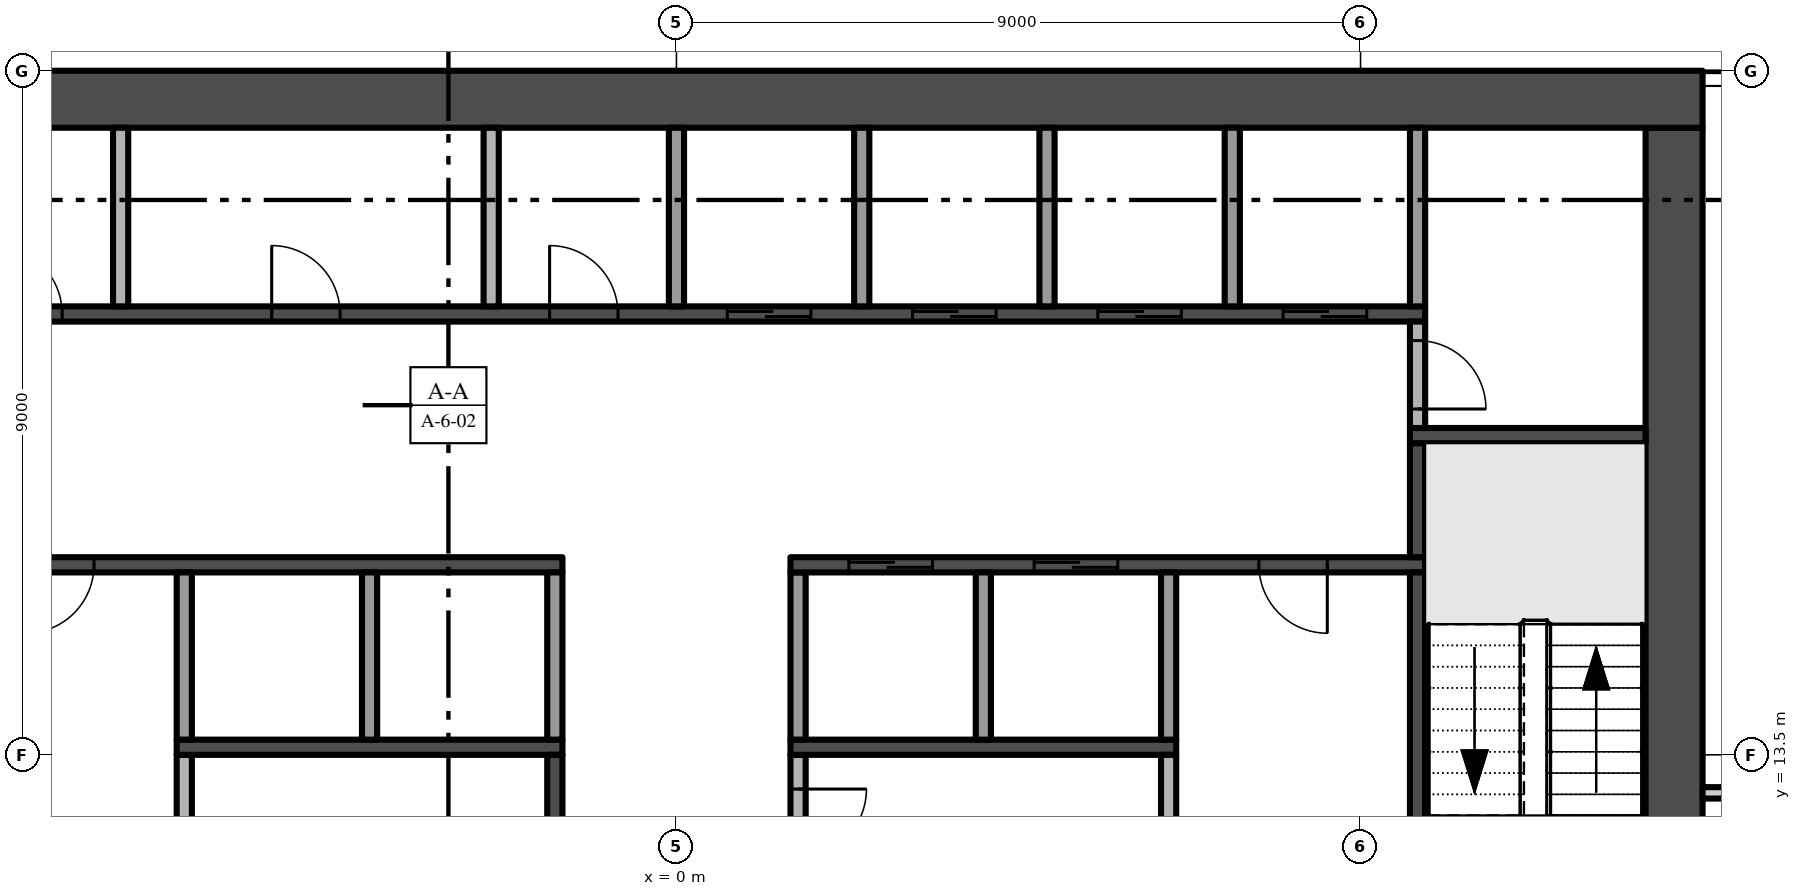
"""IFC4 building model, lengths in metres.
Left out: names, types, materials, properties, quantities, classifications, styles, units other than length and angle.
Written with IfcOpenShell. Run it as: python <this file> out.ifc"""

import sys

from ifc_helpers import new_model, si_unit, direction, frame, frame_2d, origin, place, context, subcontext, project, spatial, rectangle, extrude, element, fill, save


model = new_model("IFC4")
c1 = context("Model", 3, precision=1e-05, world=origin(), true_north=direction((0.0, 1.0)))
c2 = subcontext(c1, "Body", "Model", "MODEL_VIEW")
j1 = project(units=[si_unit("LENGTHUNIT", "METRE"), si_unit("PLANEANGLEUNIT", "RADIAN")], contexts=[c1])
p1 = place(None, origin())
s1 = spatial("IfcSite", under=j1, at=p1, CompositionType="ELEMENT")
p2 = place(p1, origin())
s2 = spatial("IfcBuilding", under=s1, at=p2, CompositionType="ELEMENT")
p3 = place(p2, frame((0.0, 0.0, 179.4)))
s3 = spatial("IfcBuildingStorey", under=s2, at=p3, CompositionType="ELEMENT", Elevation=179.4)
p4 = place(p3, frame((13.125, 5.25, -0.3), z_axis=(0.0, 0.0, 1.0), x_axis=(0.0, 1.0, 0.0)))
e1 = element("IfcWall", 1, at=p4, inside=s3, PredefinedType="SHEAR", context=c2, shape_type="SweptSolid", body=[
    extrude(rectangle(XDim=16.5, YDim=0.75, at=frame_2d((8.25, 0.0))), origin(), (0.0, 0.0, 1.0), 5.0),
])
p5 = place(p4, frame((6.15, 0.0, 0.3)))
e2 = element("IfcOpeningElement", 2, at=p5, cuts=e1, PredefinedType="OPENING", context=c2, shape_type="SweptSolid", body=[
    extrude(rectangle(XDim=1.2, YDim=2.2, at=frame_2d((0.6, 1.1))), frame((0.0, 0.385, 0.0), z_axis=(0.0, -1.0, 0.0), x_axis=(1.0, 0.0, 0.0)), (0.0, 0.0, 1.0), 0.77),
])
p6 = place(p3, frame((13.5, 22.125, -0.3), z_axis=(0.0, 0.0, 1.0), x_axis=(-1.0, 0.0, 0.0)))
e3 = element("IfcWall", 3, at=p6, inside=s3, PredefinedType="SHEAR", context=c2, shape_type="SweptSolid", body=[
    extrude(rectangle(XDim=27.0, YDim=0.75, at=frame_2d((13.5, 0.0))), origin(), (0.0, 0.0, 1.0), 5.0),
])
p7 = place(p3, frame((-1.5, 16.0, 0.0), z_axis=(0.0, 0.0, 1.0), x_axis=(-1.0, 0.0, 0.0)))
e4 = element("IfcWall", 4, at=p7, inside=s3, PredefinedType="SHEAR", context=c2, shape_type="SweptSolid", body=[
    extrude(rectangle(XDim=8.35, YDim=0.2, at=frame_2d((4.175, 0.0))), origin(), (0.0, 0.0, 1.0), 4.7),
])
p8 = place(p7, frame((6.162, 0.0, 0.0)))
e5 = element("IfcOpeningElement", 5, at=p8, cuts=e4, PredefinedType="OPENING", context=c2, shape_type="SweptSolid", body=[
    extrude(rectangle(XDim=0.9, YDim=2.1, at=frame_2d((0.45, 1.05))), frame((0.0, 0.11, 0.0), z_axis=(0.0, -1.0, 0.0), x_axis=(1.0, 0.0, 0.0)), (0.0, 0.0, 1.0), 0.22),
])
p9 = place(p3, frame((-9.85, 19.3, 0.0), z_axis=(0.0, 0.0, 1.0), x_axis=(1.0, 0.0, 0.0)))
e6 = element("IfcWall", 6, at=p9, inside=s3, PredefinedType="SHEAR", context=c2, shape_type="SweptSolid", body=[
    extrude(rectangle(XDim=19.7, YDim=0.2, at=frame_2d((9.85, 0.0))), origin(), (0.0, 0.0, 1.0), 4.7),
])
p10 = place(p9, frame((10.519, 0.0, 0.0)))
e7 = element("IfcOpeningElement", 7, at=p10, cuts=e6, PredefinedType="OPENING", context=c2, shape_type="SweptSolid", body=[
    extrude(rectangle(XDim=1.1, YDim=2.1, at=frame_2d((0.55, 1.05))), frame((0.0, 0.11, 0.0), z_axis=(0.0, -1.0, 0.0), x_axis=(1.0, 0.0, 0.0)), (0.0, 0.0, 1.0), 0.22),
])
p11 = place(p9, frame((12.956, 0.0, 0.0)))
e8 = element("IfcOpeningElement", 8, at=p11, cuts=e6, PredefinedType="OPENING", context=c2, shape_type="SweptSolid", body=[
    extrude(rectangle(XDim=1.1, YDim=2.1, at=frame_2d((0.55, 1.05))), frame((0.0, 0.11, 0.0), z_axis=(0.0, -1.0, 0.0), x_axis=(1.0, 0.0, 0.0)), (0.0, 0.0, 1.0), 0.22),
])
p12 = place(p9, frame((15.394, 0.0, 0.0)))
e9 = element("IfcOpeningElement", 9, at=p12, cuts=e6, PredefinedType="OPENING", context=c2, shape_type="SweptSolid", body=[
    extrude(rectangle(XDim=1.1, YDim=2.1, at=frame_2d((0.55, 1.05))), frame((0.0, 0.11, 0.0), z_axis=(0.0, -1.0, 0.0), x_axis=(1.0, 0.0, 0.0)), (0.0, 0.0, 1.0), 0.22),
])
p13 = place(p9, frame((17.831, 0.0, 0.0)))
e10 = element("IfcOpeningElement", 10, at=p13, cuts=e6, PredefinedType="OPENING", context=c2, shape_type="SweptSolid", body=[
    extrude(rectangle(XDim=1.1, YDim=2.1, at=frame_2d((0.55, 1.05))), frame((0.0, 0.11, 0.0), z_axis=(0.0, -1.0, 0.0), x_axis=(1.0, 0.0, 0.0)), (0.0, 0.0, 1.0), 0.22),
])
p14 = place(p9, frame((0.869, 0.0, 0.0)))
e11 = element("IfcOpeningElement", 11, at=p14, cuts=e6, PredefinedType="OPENING", context=c2, shape_type="SweptSolid", body=[
    extrude(rectangle(XDim=0.9, YDim=2.1, at=frame_2d((0.45, 1.05))), frame((0.0, 0.11, 0.0), z_axis=(0.0, -1.0, 0.0), x_axis=(1.0, 0.0, 0.0)), (0.0, 0.0, 1.0), 0.22),
])
p15 = place(p9, frame((4.525, 0.0, 0.0)))
e12 = element("IfcOpeningElement", 12, at=p15, cuts=e6, PredefinedType="OPENING", context=c2, shape_type="SweptSolid", body=[
    extrude(rectangle(XDim=0.9, YDim=2.1, at=frame_2d((0.45, 1.05))), frame((0.0, 0.11, 0.0), z_axis=(0.0, -1.0, 0.0), x_axis=(1.0, 0.0, 0.0)), (0.0, 0.0, 1.0), 0.22),
])
p16 = place(p9, frame((8.181, 0.0, 0.0)))
e13 = element("IfcOpeningElement", 13, at=p16, cuts=e6, PredefinedType="OPENING", context=c2, shape_type="SweptSolid", body=[
    extrude(rectangle(XDim=0.9, YDim=2.1, at=frame_2d((0.45, 1.05))), frame((0.0, 0.11, 0.0), z_axis=(0.0, -1.0, 0.0), x_axis=(1.0, 0.0, 0.0)), (0.0, 0.0, 1.0), 0.22),
])
p17 = place(p3, frame((-7.312, 19.4, 0.0), z_axis=(0.0, 0.0, 1.0), x_axis=(0.0, 1.0, 0.0)))
e14 = element("IfcWall", 14, at=p17, inside=s3, PredefinedType="PARTITIONING", context=c2, shape_type="SweptSolid", body=[
    extrude(rectangle(XDim=2.35, YDim=0.2, at=frame_2d((1.175, 0.0))), origin(), (0.0, 0.0, 1.0), 4.7),
])
p18 = place(p3, frame((-6.475, 8.15, 0.0), z_axis=(0.0, 0.0, 1.0), x_axis=(0.0, 1.0, 0.0)))
e15 = element("IfcWall", 15, at=p18, inside=s3, PredefinedType="PARTITIONING", context=c2, shape_type="SweptSolid", body=[
    extrude(rectangle(XDim=5.35, YDim=0.2, at=frame_2d((2.675, 0.0))), origin(), (0.0, 0.0, 1.0), 4.7),
])
p19 = place(p3, frame((-6.575, 13.6, 0.0), z_axis=(0.0, 0.0, 1.0), x_axis=(1.0, 0.0, 0.0)))
e16 = element("IfcWall", 16, at=p19, inside=s3, PredefinedType="SHEAR", context=c2, shape_type="SweptSolid", body=[
    extrude(rectangle(XDim=5.075, YDim=0.2, at=frame_2d((2.538, 0.0))), origin(), (0.0, 0.0, 1.0), 4.7),
])
for number, where, z_axis, x_axis in (
    (17, (-6.475, 13.7, 0.0), (0.0, 0.0, 1.0), (0.0, 1.0, 0.0)),
    (18, (-4.037, 13.7, 0.0), (0.0, 0.0, 1.0), (0.0, 1.0, 0.0)),
):
    element("IfcWall", number, at=place(p3, frame(where, z_axis=z_axis, x_axis=x_axis)), inside=s3, PredefinedType="PARTITIONING", context=c2, shape_type="SweptSolid", body=[
        extrude(rectangle(XDim=2.2, YDim=0.2, at=frame_2d((1.1, 0.0))), origin(), (0.0, 0.0, 1.0), 4.7),
    ])
p20 = place(p3, frame((-2.438, 19.4, 0.0), z_axis=(0.0, 0.0, 1.0), x_axis=(0.0, 1.0, 0.0)))
e19 = element("IfcWall", 19, at=p20, inside=s3, PredefinedType="PARTITIONING", context=c2, shape_type="SweptSolid", body=[
    extrude(rectangle(XDim=2.35, YDim=0.2, at=frame_2d((1.175, 0.0))), origin(), (0.0, 0.0, 1.0), 4.7),
])
p21 = place(p3, frame((-1.6, 8.15, 0.0), z_axis=(0.0, 0.0, 1.0), x_axis=(0.0, 1.0, 0.0)))
e20 = element("IfcWall", 20, at=p21, inside=s3, PredefinedType="SHEAR", context=c2, shape_type="SweptSolid", body=[
    extrude(rectangle(XDim=5.35, YDim=0.2, at=frame_2d((2.675, 0.0))), origin(), (0.0, 0.0, 1.0), 4.7),
])
p22 = place(p21, frame((2.225, 0.0, 0.0)))
e21 = element("IfcOpeningElement", 21, at=p22, cuts=e20, PredefinedType="OPENING", context=c2, shape_type="SweptSolid", body=[
    extrude(rectangle(XDim=0.9, YDim=2.1, at=frame_2d((0.45, 1.05))), frame((0.0, 0.11, 0.0), z_axis=(0.0, -1.0, 0.0), x_axis=(1.0, 0.0, 0.0)), (0.0, 0.0, 1.0), 0.22),
])
p23 = place(p3, frame((-1.6, 13.7, 0.0), z_axis=(0.0, 0.0, 1.0), x_axis=(0.0, 1.0, 0.0)))
e22 = element("IfcWall", 22, at=p23, inside=s3, PredefinedType="PARTITIONING", context=c2, shape_type="SweptSolid", body=[
    extrude(rectangle(XDim=2.2, YDim=0.2, at=frame_2d((1.1, 0.0))), origin(), (0.0, 0.0, 1.0), 4.7),
])
p24 = place(p3, frame((0.0, 19.4, 0.0), z_axis=(0.0, 0.0, 1.0), x_axis=(0.0, 1.0, 0.0)))
e23 = element("IfcWall", 23, at=p24, inside=s3, PredefinedType="PARTITIONING", context=c2, shape_type="SweptSolid", body=[
    extrude(rectangle(XDim=2.35, YDim=0.2, at=frame_2d((1.175, 0.0))), origin(), (0.0, 0.0, 1.0), 4.7),
])
p25 = place(p3, frame((1.6, 13.5, 0.0), z_axis=(0.0, 0.0, 1.0), x_axis=(0.0, -1.0, 0.0)))
e24 = element("IfcWall", 24, at=p25, inside=s3, PredefinedType="PARTITIONING", context=c2, shape_type="SweptSolid", body=[
    extrude(rectangle(XDim=1.8, YDim=0.2, at=frame_2d((0.9, 0.0))), origin(), (0.0, 0.0, 1.0), 4.7),
])
p26 = place(p25, frame((0.45, 0.0, 0.0)))
e25 = element("IfcOpeningElement", 25, at=p26, cuts=e24, PredefinedType="OPENING", context=c2, shape_type="SweptSolid", body=[
    extrude(rectangle(XDim=0.9, YDim=2.1, at=frame_2d((0.45, 1.05))), frame((0.0, 0.11, 0.0), z_axis=(0.0, -1.0, 0.0), x_axis=(1.0, 0.0, 0.0)), (0.0, 0.0, 1.0), 0.22),
])
p27 = place(p3, frame((1.5, 13.6, 0.0), z_axis=(0.0, 0.0, 1.0), x_axis=(1.0, 0.0, 0.0)))
e26 = element("IfcWall", 26, at=p27, inside=s3, PredefinedType="SHEAR", context=c2, shape_type="SweptSolid", body=[
    extrude(rectangle(XDim=5.075, YDim=0.2, at=frame_2d((2.538, 0.0))), origin(), (0.0, 0.0, 1.0), 4.7),
])
p28 = place(p3, frame((1.6, 13.7, 0.0), z_axis=(0.0, 0.0, 1.0), x_axis=(0.0, 1.0, 0.0)))
e27 = element("IfcWall", 27, at=p28, inside=s3, PredefinedType="PARTITIONING", context=c2, shape_type="SweptSolid", body=[
    extrude(rectangle(XDim=2.2, YDim=0.2, at=frame_2d((1.1, 0.0))), origin(), (0.0, 0.0, 1.0), 4.7),
])
p29 = place(p3, frame((9.85, 16.0, 0.0), z_axis=(0.0, 0.0, 1.0), x_axis=(-1.0, 0.0, 0.0)))
e28 = element("IfcWall", 28, at=p29, inside=s3, PredefinedType="SHEAR", context=c2, shape_type="SweptSolid", body=[
    extrude(rectangle(XDim=8.35, YDim=0.2, at=frame_2d((4.175, 0.0))), origin(), (0.0, 0.0, 1.0), 4.7),
])
p30 = place(p29, frame((6.481, 0.0, 0.0)))
e29 = element("IfcOpeningElement", 29, at=p30, cuts=e28, PredefinedType="OPENING", context=c2, shape_type="SweptSolid", body=[
    extrude(rectangle(XDim=1.1, YDim=2.1, at=frame_2d((0.55, 1.05))), frame((0.0, 0.11, 0.0), z_axis=(0.0, -1.0, 0.0), x_axis=(1.0, 0.0, 0.0)), (0.0, 0.0, 1.0), 0.22),
])
p31 = place(p29, frame((4.044, 0.0, 0.0)))
e30 = element("IfcOpeningElement", 30, at=p31, cuts=e28, PredefinedType="OPENING", context=c2, shape_type="SweptSolid", body=[
    extrude(rectangle(XDim=1.1, YDim=2.1, at=frame_2d((0.55, 1.05))), frame((0.0, 0.11, 0.0), z_axis=(0.0, -1.0, 0.0), x_axis=(1.0, 0.0, 0.0)), (0.0, 0.0, 1.0), 0.22),
])
p32 = place(p29, frame((1.288, 0.0, 0.0)))
e31 = element("IfcOpeningElement", 31, at=p32, cuts=e28, PredefinedType="OPENING", context=c2, shape_type="SweptSolid", body=[
    extrude(rectangle(XDim=0.9, YDim=2.1, at=frame_2d((0.45, 1.05))), frame((0.0, 0.11, 0.0), z_axis=(0.0, -1.0, 0.0), x_axis=(1.0, 0.0, 0.0)), (0.0, 0.0, 1.0), 0.22),
])
p33 = place(p3, frame((2.438, 19.4, 0.0), z_axis=(0.0, 0.0, 1.0), x_axis=(0.0, 1.0, 0.0)))
e32 = element("IfcWall", 32, at=p33, inside=s3, PredefinedType="PARTITIONING", context=c2, shape_type="SweptSolid", body=[
    extrude(rectangle(XDim=2.35, YDim=0.2, at=frame_2d((1.175, 0.0))), origin(), (0.0, 0.0, 1.0), 4.7),
])
p34 = place(p3, frame((4.037, 13.7, 0.0), z_axis=(0.0, 0.0, 1.0), x_axis=(0.0, 1.0, 0.0)))
e33 = element("IfcWall", 33, at=p34, inside=s3, PredefinedType="PARTITIONING", context=c2, shape_type="SweptSolid", body=[
    extrude(rectangle(XDim=2.2, YDim=0.2, at=frame_2d((1.1, 0.0))), origin(), (0.0, 0.0, 1.0), 4.7),
])
p35 = place(p3, frame((4.875, 19.4, 0.0), z_axis=(0.0, 0.0, 1.0), x_axis=(0.0, 1.0, 0.0)))
e34 = element("IfcWall", 34, at=p35, inside=s3, PredefinedType="PARTITIONING", context=c2, shape_type="SweptSolid", body=[
    extrude(rectangle(XDim=2.35, YDim=0.2, at=frame_2d((1.175, 0.0))), origin(), (0.0, 0.0, 1.0), 4.7),
])
p36 = place(p3, frame((6.475, 12.3, 0.0), z_axis=(0.0, 0.0, 1.0), x_axis=(0.0, 1.0, 0.0)))
e35 = element("IfcWall", 35, at=p36, inside=s3, PredefinedType="PARTITIONING", context=c2, shape_type="SweptSolid", body=[
    extrude(rectangle(XDim=1.2, YDim=0.2, at=frame_2d((0.6, 0.0))), origin(), (0.0, 0.0, 1.0), 4.7),
])
p37 = place(p3, frame((6.475, 13.7, 0.0), z_axis=(0.0, 0.0, 1.0), x_axis=(0.0, 1.0, 0.0)))
e36 = element("IfcWall", 36, at=p37, inside=s3, PredefinedType="PARTITIONING", context=c2, shape_type="SweptSolid", body=[
    extrude(rectangle(XDim=2.2, YDim=0.2, at=frame_2d((1.1, 0.0))), origin(), (0.0, 0.0, 1.0), 4.7),
])
p38 = place(p3, frame((7.312, 19.4, 0.0), z_axis=(0.0, 0.0, 1.0), x_axis=(0.0, 1.0, 0.0)))
e37 = element("IfcWall", 37, at=p38, inside=s3, PredefinedType="PARTITIONING", context=c2, shape_type="SweptSolid", body=[
    extrude(rectangle(XDim=2.35, YDim=0.2, at=frame_2d((1.175, 0.0))), origin(), (0.0, 0.0, 1.0), 4.7),
])
p39 = place(p3, frame((9.75, 12.3, 0.0), z_axis=(0.0, 0.0, 1.0), x_axis=(0.0, 1.0, 0.0)))
e38 = element("IfcWall", 38, at=p39, inside=s3, PredefinedType="SHEAR", context=c2, shape_type="SweptSolid", body=[
    extrude(rectangle(XDim=3.6, YDim=0.2, at=frame_2d((1.8, 0.0))), origin(), (0.0, 0.0, 1.0), 4.7),
])
p40 = place(p3, frame((9.75, 16.1, 0.0), z_axis=(0.0, 0.0, 1.0), x_axis=(0.0, 1.0, 0.0)))
e39 = element("IfcWall", 39, at=p40, inside=s3, PredefinedType="SHEAR", context=c2, shape_type="SweptSolid", body=[
    extrude(rectangle(XDim=1.5, YDim=0.2, at=frame_2d((0.75, 0.0))), origin(), (0.0, 0.0, 1.0), 4.7),
])
p41 = place(p3, frame((9.65, 17.7, 0.0), z_axis=(0.0, 0.0, 1.0), x_axis=(1.0, 0.0, 0.0)))
e40 = element("IfcWall", 40, at=p41, inside=s3, PredefinedType="SHEAR", context=c2, shape_type="SweptSolid", body=[
    extrude(rectangle(XDim=3.1, YDim=0.2, at=frame_2d((1.55, 0.0))), origin(), (0.0, 0.0, 1.0), 4.7),
])
p42 = place(p3, frame((9.75, 19.2, 0.0), z_axis=(0.0, 0.0, 1.0), x_axis=(0.0, -1.0, 0.0)))
e41 = element("IfcWall", 41, at=p42, inside=s3, PredefinedType="PARTITIONING", context=c2, shape_type="SweptSolid", body=[
    extrude(rectangle(XDim=1.4, YDim=0.2, at=frame_2d((0.7, 0.0))), origin(), (0.0, 0.0, 1.0), 4.7),
])
p43 = place(p42, frame((0.25, 0.0, 0.0)))
e42 = element("IfcOpeningElement", 42, at=p43, cuts=e41, PredefinedType="OPENING", context=c2, shape_type="SweptSolid", body=[
    extrude(rectangle(XDim=0.9, YDim=2.1, at=frame_2d((0.45, 1.05))), frame((0.0, 0.11, 0.0), z_axis=(0.0, -1.0, 0.0), x_axis=(1.0, 0.0, 0.0)), (0.0, 0.0, 1.0), 0.22),
])
p44 = place(p3, frame((9.75, 19.4, 0.0), z_axis=(0.0, 0.0, 1.0), x_axis=(0.0, 1.0, 0.0)))
e43 = element("IfcWall", 43, at=p44, inside=s3, PredefinedType="PARTITIONING", context=c2, shape_type="SweptSolid", body=[
    extrude(rectangle(XDim=2.35, YDim=0.2, at=frame_2d((1.175, 0.0))), origin(), (0.0, 0.0, 1.0), 4.7),
])
p45 = place(p3, frame((13.5, 13.0, 0.0), z_axis=(0.0, 0.0, 1.0), x_axis=(1.0, 0.0, 0.0)))
e44 = element("IfcWall", 44, at=p45, inside=s3, PredefinedType="PARTITIONING", context=c2, shape_type="SweptSolid", body=[
    extrude(rectangle(XDim=3.925, YDim=0.15, at=frame_2d((1.962, 0.0))), origin(), (0.0, 0.0, 1.0), 4.7),
])
p46 = place(p10, origin())
e45 = element("IfcDoor", 45, at=p46, inside=s3, OperationType="SLIDING_TO_RIGHT", PredefinedType="DOOR", context=c2, shape_type="SweptSolid", body=[
    extrude(rectangle(XDim=1.1, YDim=2.1, at=frame_2d((0.55, 1.05))), frame((0.0, 0.025, 0.0), z_axis=(0.0, -1.0, 0.0), x_axis=(1.0, 0.0, 0.0)), (0.0, 0.0, 1.0), 0.05),
])
fill(e7, e45)
p47 = place(p11, origin())
e46 = element("IfcDoor", 46, at=p47, inside=s3, OperationType="SLIDING_TO_RIGHT", PredefinedType="DOOR", context=c2, shape_type="SweptSolid", body=[
    extrude(rectangle(XDim=1.1, YDim=2.1, at=frame_2d((0.55, 1.05))), frame((0.0, 0.025, 0.0), z_axis=(0.0, -1.0, 0.0), x_axis=(1.0, 0.0, 0.0)), (0.0, 0.0, 1.0), 0.05),
])
fill(e8, e46)
p48 = place(p12, origin())
e47 = element("IfcDoor", 47, at=p48, inside=s3, OperationType="SLIDING_TO_RIGHT", PredefinedType="DOOR", context=c2, shape_type="SweptSolid", body=[
    extrude(rectangle(XDim=1.1, YDim=2.1, at=frame_2d((0.55, 1.05))), frame((0.0, 0.025, 0.0), z_axis=(0.0, -1.0, 0.0), x_axis=(1.0, 0.0, 0.0)), (0.0, 0.0, 1.0), 0.05),
])
fill(e9, e47)
p49 = place(p13, origin())
e48 = element("IfcDoor", 48, at=p49, inside=s3, OperationType="SLIDING_TO_RIGHT", PredefinedType="DOOR", context=c2, shape_type="SweptSolid", body=[
    extrude(rectangle(XDim=1.1, YDim=2.1, at=frame_2d((0.55, 1.05))), frame((0.0, 0.025, 0.0), z_axis=(0.0, -1.0, 0.0), x_axis=(1.0, 0.0, 0.0)), (0.0, 0.0, 1.0), 0.05),
])
fill(e10, e48)
p50 = place(p30, origin())
e49 = element("IfcDoor", 49, at=p50, inside=s3, OperationType="SLIDING_TO_RIGHT", PredefinedType="DOOR", context=c2, shape_type="SweptSolid", body=[
    extrude(rectangle(XDim=1.1, YDim=2.1, at=frame_2d((0.55, 1.05))), frame((0.0, 0.025, 0.0), z_axis=(0.0, -1.0, 0.0), x_axis=(1.0, 0.0, 0.0)), (0.0, 0.0, 1.0), 0.05),
])
fill(e29, e49)
p51 = place(p31, origin())
e50 = element("IfcDoor", 50, at=p51, inside=s3, OperationType="SLIDING_TO_RIGHT", PredefinedType="DOOR", context=c2, shape_type="SweptSolid", body=[
    extrude(rectangle(XDim=1.1, YDim=2.1, at=frame_2d((0.55, 1.05))), frame((0.0, 0.025, 0.0), z_axis=(0.0, -1.0, 0.0), x_axis=(1.0, 0.0, 0.0)), (0.0, 0.0, 1.0), 0.05),
])
fill(e30, e50)
p52 = place(p8, origin())
e51 = element("IfcDoor", 51, at=p52, inside=s3, OperationType="SINGLE_SWING_RIGHT", PredefinedType="DOOR", context=c2, shape_type="SweptSolid", body=[
    extrude(rectangle(XDim=0.9, YDim=2.1, at=frame_2d((0.45, 1.05))), frame((0.0, 0.025, 0.0), z_axis=(0.0, -1.0, 0.0), x_axis=(1.0, 0.0, 0.0)), (0.0, 0.0, 1.0), 0.05),
])
fill(e5, e51)
p53 = place(p26, origin())
e52 = element("IfcDoor", 52, at=p53, inside=s3, OperationType="SINGLE_SWING_LEFT", PredefinedType="DOOR", context=c2, shape_type="SweptSolid", body=[
    extrude(rectangle(XDim=0.9, YDim=2.1, at=frame_2d((0.45, 1.05))), frame((0.0, 0.025, 0.0), z_axis=(0.0, -1.0, 0.0), x_axis=(1.0, 0.0, 0.0)), (0.0, 0.0, 1.0), 0.05),
])
fill(e25, e52)
p54 = place(p32, origin())
e53 = element("IfcDoor", 53, at=p54, inside=s3, OperationType="SINGLE_SWING_LEFT", PredefinedType="DOOR", context=c2, shape_type="SweptSolid", body=[
    extrude(rectangle(XDim=0.9, YDim=2.1, at=frame_2d((0.45, 1.05))), frame((0.0, 0.025, 0.0), z_axis=(0.0, -1.0, 0.0), x_axis=(1.0, 0.0, 0.0)), (0.0, 0.0, 1.0), 0.05),
])
fill(e31, e53)
p55 = place(p43, origin())
e54 = element("IfcDoor", 54, at=p55, inside=s3, OperationType="SINGLE_SWING_RIGHT", PredefinedType="DOOR", context=c2, shape_type="SweptSolid", body=[
    extrude(rectangle(XDim=0.9, YDim=2.1, at=frame_2d((0.45, 1.05))), frame((0.0, 0.025, 0.0), z_axis=(0.0, -1.0, 0.0), x_axis=(1.0, 0.0, 0.0)), (0.0, 0.0, 1.0), 0.05),
])
fill(e42, e54)
p56 = place(p14, origin())
e55 = element("IfcDoor", 55, at=p56, inside=s3, OperationType="SINGLE_SWING_LEFT", PredefinedType="DOOR", context=c2, shape_type="SweptSolid", body=[
    extrude(rectangle(XDim=0.9, YDim=2.1, at=frame_2d((0.45, 1.05))), frame((0.0, 0.025, 0.0), z_axis=(0.0, -1.0, 0.0), x_axis=(1.0, 0.0, 0.0)), (0.0, 0.0, 1.0), 0.05),
])
fill(e11, e55)
p57 = place(p15, origin())
e56 = element("IfcDoor", 56, at=p57, inside=s3, OperationType="SINGLE_SWING_LEFT", PredefinedType="DOOR", context=c2, shape_type="SweptSolid", body=[
    extrude(rectangle(XDim=0.9, YDim=2.1, at=frame_2d((0.45, 1.05))), frame((0.0, 0.025, 0.0), z_axis=(0.0, -1.0, 0.0), x_axis=(1.0, 0.0, 0.0)), (0.0, 0.0, 1.0), 0.05),
])
fill(e12, e56)
p58 = place(p16, origin())
e57 = element("IfcDoor", 57, at=p58, inside=s3, OperationType="SINGLE_SWING_LEFT", PredefinedType="DOOR", context=c2, shape_type="SweptSolid", body=[
    extrude(rectangle(XDim=0.9, YDim=2.1, at=frame_2d((0.45, 1.05))), frame((0.0, 0.025, 0.0), z_axis=(0.0, -1.0, 0.0), x_axis=(1.0, 0.0, 0.0)), (0.0, 0.0, 1.0), 0.05),
])
fill(e13, e57)
save(model, sys.argv[1])
